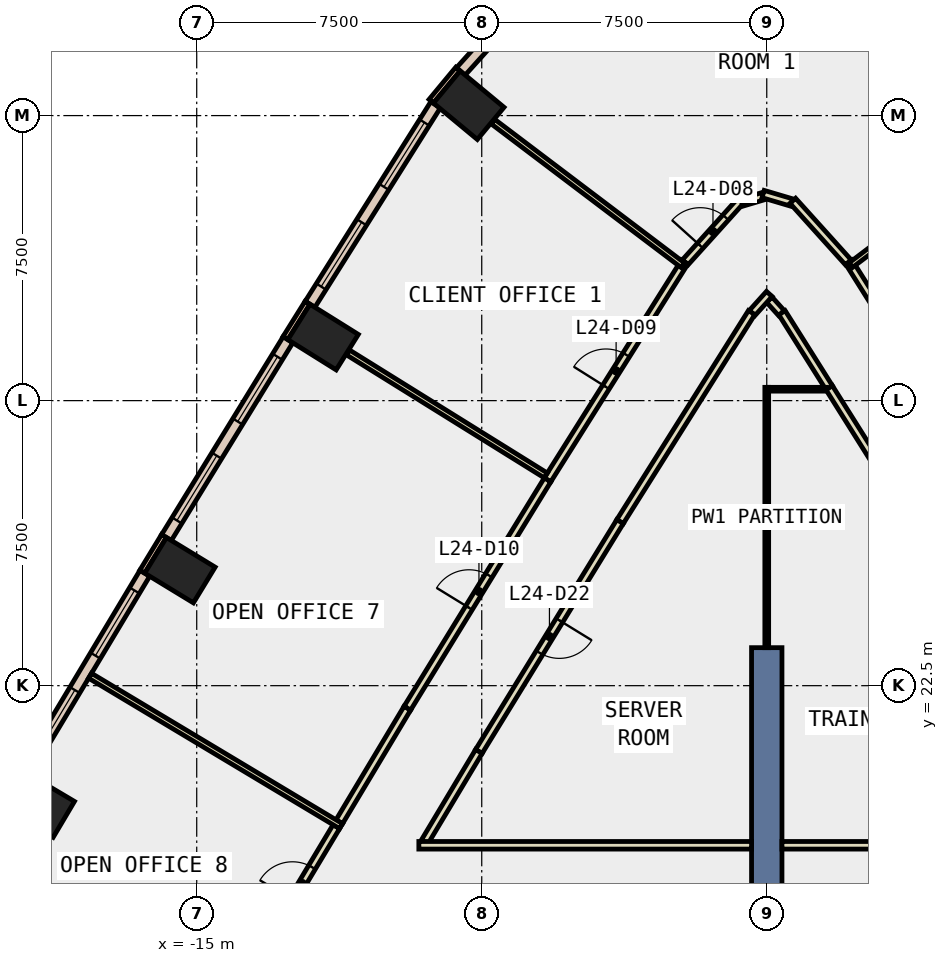
"""IFC4 building model, lengths in metres.
Left out: names, types, materials, properties, quantities, classifications, styles, units other than length and angle.
Written with IfcOpenShell. Run it as: python <this file> out.ifc"""

import sys

from ifc_helpers import new_model, si_unit, direction, frame, frame_2d, origin, origin_2d, place, context, subcontext, project, spatial, rectangle, extrude, element, fill, save


model = new_model("IFC4")
c1 = context("Model", 3, precision=1e-05, world=origin(), true_north=direction((0.0, 1.0)))
c2 = subcontext(c1, "Body", "Model", "MODEL_VIEW")
j1 = project(units=[si_unit("LENGTHUNIT", "METRE"), si_unit("PLANEANGLEUNIT", "RADIAN")], contexts=[c1])
p1 = place(None, origin())
s1 = spatial("IfcSite", under=j1, at=p1, CompositionType="ELEMENT")
p2 = place(p1, origin())
s2 = spatial("IfcBuilding", under=s1, at=p2, CompositionType="ELEMENT")
p3 = place(p2, frame((0.0, 0.0, 111.8)))
s3 = spatial("IfcBuildingStorey", under=s2, at=p3, CompositionType="ELEMENT", Elevation=111.8)
for number, where, z_axis, x_axis in (
    (1, (-7.842, 37.774, -0.4), (0.0, 0.0, 1.0), (0.638, 0.77, 0.0)),
    (2, (-11.675, 31.673, -0.4), (0.0, 0.0, 1.0), (0.53, 0.848, 0.0)),
    (3, (-15.442, 25.539, -0.4), (0.0, 0.0, 1.0), (0.52, 0.854, 0.0)),
    (4, (-19.143, 19.364, -0.4), (0.0, 0.0, 1.0), (0.51, 0.86, 0.0)),
):
    element("IfcColumn", number, at=place(p3, frame(where, z_axis=z_axis, x_axis=x_axis)), inside=s3, PredefinedType="COLUMN", context=c2, shape_type="SweptSolid", body=[
        extrude(rectangle(XDim=1.1, YDim=1.5, at=origin_2d()), origin(), (0.0, 0.0, 1.0), 4.2),
    ])
p4 = place(p3, frame((0.0, 14.5, -0.4), z_axis=(0.0, 0.0, 1.0), x_axis=(0.0, 1.0, 0.0)))
e5 = element("IfcWall", 5, at=p4, inside=s3, PredefinedType="SHEAR", context=c2, shape_type="SweptSolid", body=[
    extrude(rectangle(XDim=9.0, YDim=0.8, at=frame_2d((4.5, 0.0))), origin(), (0.0, 0.0, 1.0), 4.2),
])
p5 = place(p3, frame((-8.126, 38.724, 0.0), z_axis=(0.0, 0.0, 1.0), x_axis=(-0.638435351024, -0.769675452748, 0.0)))
e6 = element("IfcWall", 6, at=p5, inside=s3, PredefinedType="STANDARD", context=c2, shape_type="SweptSolid", body=[
    extrude(rectangle(XDim=1.099, YDim=0.15, at=frame_2d((0.55, 0.0))), origin(), (0.0, 0.0, 1.0), 3.8),
])
p6 = place(p3, frame((-12.083, 32.577, 0.0), z_axis=(0.0, 0.0, 1.0), x_axis=(-0.52997899071, -0.848010771987, 0.0)))
e7 = element("IfcWall", 7, at=p6, inside=s3, PredefinedType="STANDARD", context=c2, shape_type="SweptSolid", body=[
    extrude(rectangle(XDim=1.1, YDim=0.15, at=frame_2d((0.55, 0.0))), origin(), (0.0, 0.0, 1.0), 3.8),
])
p7 = place(p3, frame((-15.861, 26.438, 0.0), z_axis=(0.0, 0.0, 1.0), x_axis=(-0.519869515594, -0.854245682901, 0.0)))
e8 = element("IfcWall", 8, at=p7, inside=s3, PredefinedType="STANDARD", context=c2, shape_type="SweptSolid", body=[
    extrude(rectangle(XDim=1.1, YDim=0.15, at=frame_2d((0.55, 0.0))), origin(), (0.0, 0.0, 1.0), 3.8),
])
p8 = place(p3, frame((-5.445, 41.552, 0.0), z_axis=(0.0, 0.0, 1.0), x_axis=(-0.66966434159, -0.742663900834, 0.0)))
e9 = element("IfcWall", 9, at=p8, inside=s3, PredefinedType="STANDARD", context=c2, shape_type="SweptSolid", body=[
    extrude(rectangle(XDim=3.893, YDim=0.3, at=frame_2d((1.946, 0.0))), origin(), (0.0, 0.0, 1.0), 3.8),
])
p9 = place(p8, frame((1.246, 0.0, 0.9)))
e10 = element("IfcOpeningElement", 10, at=p9, cuts=e9, PredefinedType="OPENING", context=c2, shape_type="SweptSolid", body=[
    extrude(rectangle(XDim=1.4, YDim=2.6, at=frame_2d((0.7, 1.3))), frame((0.0, 0.16, 0.0), z_axis=(0.0, -1.0, 0.0), x_axis=(1.0, 0.0, 0.0)), (0.0, 0.0, 1.0), 0.32),
])
p10 = place(p3, frame((-8.714, 37.784, 0.0), z_axis=(0.0, 0.0, 1.0), x_axis=(-0.532699467907, -0.846304482377, 0.0)))
e11 = element("IfcWall", 11, at=p10, inside=s3, PredefinedType="STANDARD", context=c2, shape_type="SweptSolid", body=[
    extrude(rectangle(XDim=6.202, YDim=0.3, at=frame_2d((3.101, 0.0))), origin(), (0.0, 0.0, 1.0), 3.8),
])
p11 = place(p10, frame((0.551, 0.0, 0.9)))
e12 = element("IfcOpeningElement", 12, at=p11, cuts=e11, PredefinedType="OPENING", context=c2, shape_type="SweptSolid", body=[
    extrude(rectangle(XDim=2.0, YDim=2.6, at=frame_2d((1.0, 1.3))), frame((0.0, 0.16, 0.0), z_axis=(0.0, -1.0, 0.0), x_axis=(1.0, 0.0, 0.0)), (0.0, 0.0, 1.0), 0.32),
])
p12 = place(p10, frame((3.652, 0.0, 0.9)))
e13 = element("IfcOpeningElement", 13, at=p12, cuts=e11, PredefinedType="OPENING", context=c2, shape_type="SweptSolid", body=[
    extrude(rectangle(XDim=2.0, YDim=2.6, at=frame_2d((1.0, 1.3))), frame((0.0, 0.16, 0.0), z_axis=(0.0, -1.0, 0.0), x_axis=(1.0, 0.0, 0.0)), (0.0, 0.0, 1.0), 0.32),
])
p13 = place(p3, frame((-12.598, 31.603, 0.0), z_axis=(0.0, 0.0, 1.0), x_axis=(-0.523417276981, -0.852076495485, 0.0)))
e14 = element("IfcWall", 14, at=p13, inside=s3, PredefinedType="STANDARD", context=c2, shape_type="SweptSolid", body=[
    extrude(rectangle(XDim=6.11, YDim=0.3, at=frame_2d((3.055, 0.0))), origin(), (0.0, 0.0, 1.0), 3.8),
])
p14 = place(p13, frame((0.527, 0.0, 0.9)))
e15 = element("IfcOpeningElement", 15, at=p14, cuts=e14, PredefinedType="OPENING", context=c2, shape_type="SweptSolid", body=[
    extrude(rectangle(XDim=2.0, YDim=2.6, at=frame_2d((1.0, 1.3))), frame((0.0, 0.16, 0.0), z_axis=(0.0, -1.0, 0.0), x_axis=(1.0, 0.0, 0.0)), (0.0, 0.0, 1.0), 0.32),
])
p15 = place(p13, frame((3.582, 0.0, 0.9)))
e16 = element("IfcOpeningElement", 16, at=p15, cuts=e14, PredefinedType="OPENING", context=c2, shape_type="SweptSolid", body=[
    extrude(rectangle(XDim=2.0, YDim=2.6, at=frame_2d((1.0, 1.3))), frame((0.0, 0.16, 0.0), z_axis=(0.0, -1.0, 0.0), x_axis=(1.0, 0.0, 0.0)), (0.0, 0.0, 1.0), 0.32),
])
p16 = place(p3, frame((-16.365, 25.458, 0.0), z_axis=(0.0, 0.0, 1.0), x_axis=(-0.514078503149, -0.857743139057, 0.0)))
e17 = element("IfcWall", 17, at=p16, inside=s3, PredefinedType="STANDARD", context=c2, shape_type="SweptSolid", body=[
    extrude(rectangle(XDim=6.11, YDim=0.3, at=frame_2d((3.055, 0.0))), origin(), (0.0, 0.0, 1.0), 3.8),
])
p17 = place(p16, frame((0.528, 0.0, 0.9)))
e18 = element("IfcOpeningElement", 18, at=p17, cuts=e17, PredefinedType="OPENING", context=c2, shape_type="SweptSolid", body=[
    extrude(rectangle(XDim=2.0, YDim=2.6, at=frame_2d((1.0, 1.3))), frame((0.0, 0.16, 0.0), z_axis=(0.0, -1.0, 0.0), x_axis=(1.0, 0.0, 0.0)), (0.0, 0.0, 1.0), 0.32),
])
p18 = place(p16, frame((3.583, 0.0, 0.9)))
e19 = element("IfcOpeningElement", 19, at=p18, cuts=e17, PredefinedType="OPENING", context=c2, shape_type="SweptSolid", body=[
    extrude(rectangle(XDim=2.0, YDim=2.6, at=frame_2d((1.0, 1.3))), frame((0.0, 0.16, 0.0), z_axis=(0.0, -1.0, 0.0), x_axis=(1.0, 0.0, 0.0)), (0.0, 0.0, 1.0), 0.32),
])
p19 = place(p3, frame((3.861, 26.816, 0.0), z_axis=(0.0, 0.0, 1.0), x_axis=(-0.532782188792, 0.846252408745, 0.0)))
e20 = element("IfcWall", 20, at=p19, inside=s3, PredefinedType="PARTITIONING", context=c2, shape_type="SweptSolid", body=[
    extrude(rectangle(XDim=4.167, YDim=0.2, at=frame_2d((2.083, 0.0))), origin(), (0.0, 0.0, 1.0), 3.8),
])
p20 = place(p3, frame((1.641, 30.342, 0.0), z_axis=(0.0, 0.0, 1.0), x_axis=(-0.532732797088, 0.846283502679, 0.0)))
e21 = element("IfcWall", 21, at=p20, inside=s3, PredefinedType="PARTITIONING", context=c2, shape_type="SweptSolid", body=[
    extrude(rectangle(XDim=2.333, YDim=0.2, at=frame_2d((1.167, 0.0))), origin(), (0.0, 0.0, 1.0), 3.8),
])
p21 = place(p3, frame((0.384, 32.306, 0.0), z_axis=(0.0, 0.0, 1.0), x_axis=(-0.669306261406, 0.742986627365, 0.0)))
e22 = element("IfcWall", 22, at=p21, inside=s3, PredefinedType="PARTITIONING", context=c2, shape_type="SweptSolid", body=[
    extrude(rectangle(XDim=0.474, YDim=0.2, at=frame_2d((0.237, 0.0))), origin(), (0.0, 0.0, 1.0), 3.8),
])
p22 = place(p3, frame((0.067, 32.807, 0.0), z_axis=(0.0, 0.0, 1.0), x_axis=(-0.66900475403, -0.74325812413, 0.0)))
e23 = element("IfcWall", 23, at=p22, inside=s3, PredefinedType="PARTITIONING", context=c2, shape_type="SweptSolid", body=[
    extrude(rectangle(XDim=0.674, YDim=0.2, at=frame_2d((0.337, 0.0))), origin(), (0.0, 0.0, 1.0), 3.8),
])
p23 = place(p3, frame((-0.398, 32.317, 0.0), z_axis=(0.0, 0.0, 1.0), x_axis=(-0.53276445777, -0.846263571553, 0.0)))
e24 = element("IfcWall", 24, at=p23, inside=s3, PredefinedType="PARTITIONING", context=c2, shape_type="SweptSolid", body=[
    extrude(rectangle(XDim=6.5, YDim=0.2, at=frame_2d((3.25, 0.0))), origin(), (0.0, 0.0, 1.0), 3.8),
])
p24 = place(p3, frame((-3.861, 26.816, 0.0), z_axis=(0.0, 0.0, 1.0), x_axis=(-0.523390991338, -0.852092641786, 0.0)))
e25 = element("IfcWall", 25, at=p24, inside=s3, PredefinedType="PARTITIONING", context=c2, shape_type="SweptSolid", body=[
    extrude(rectangle(XDim=7.098, YDim=0.2, at=frame_2d((3.549, 0.0))), origin(), (0.0, 0.0, 1.0), 3.8),
])
p25 = place(p24, frame((3.049, 0.0, 0.0)))
e26 = element("IfcOpeningElement", 26, at=p25, cuts=e25, PredefinedType="OPENING", context=c2, shape_type="SweptSolid", body=[
    extrude(rectangle(XDim=1.0, YDim=2.1, at=frame_2d((0.5, 1.05))), frame((0.0, 0.11, 0.0), z_axis=(0.0, -1.0, 0.0), x_axis=(1.0, 0.0, 0.0)), (0.0, 0.0, 1.0), 0.22),
])
p26 = place(p3, frame((-7.576, 20.768, 0.0), z_axis=(0.0, 0.0, 1.0), x_axis=(-0.513900868925, -0.857849577092, 0.0)))
e27 = element("IfcWall", 27, at=p26, inside=s3, PredefinedType="PARTITIONING", context=c2, shape_type="SweptSolid", body=[
    extrude(rectangle(XDim=2.777, YDim=0.2, at=frame_2d((1.388, 0.0))), origin(), (0.0, 0.0, 1.0), 3.8),
])
p27 = place(p3, frame((2.159, 33.649, 0.0), z_axis=(0.0, 0.0, 1.0), x_axis=(0.532784927572, -0.846250684462, 0.0)))
e28 = element("IfcWall", 28, at=p27, inside=s3, PredefinedType="PARTITIONING", context=c2, shape_type="SweptSolid", body=[
    extrude(rectangle(XDim=6.626, YDim=0.2, at=frame_2d((3.313, 0.0))), origin(), (0.0, 0.0, 1.0), 3.8),
])
p28 = place(p27, frame((2.888, 0.0, 0.0)))
e29 = element("IfcOpeningElement", 29, at=p28, cuts=e28, PredefinedType="OPENING", context=c2, shape_type="SweptSolid", body=[
    extrude(rectangle(XDim=1.0, YDim=2.1, at=frame_2d((0.5, 1.05))), frame((0.0, 0.11, 0.0), z_axis=(0.0, -1.0, 0.0), x_axis=(1.0, 0.0, 0.0)), (0.0, 0.0, 1.0), 0.22),
])
p29 = place(p3, frame((-2.145, 33.639, 0.0), z_axis=(0.0, 0.0, 1.0), x_axis=(0.66965737341, 0.742670184023, 0.0)))
e30 = element("IfcWall", 30, at=p29, inside=s3, PredefinedType="PARTITIONING", context=c2, shape_type="SweptSolid", body=[
    extrude(rectangle(XDim=2.18, YDim=0.2, at=frame_2d((1.09, 0.0))), origin(), (0.0, 0.0, 1.0), 3.8),
])
p30 = place(p29, frame((0.59, 0.0, 0.0)))
e31 = element("IfcOpeningElement", 31, at=p30, cuts=e30, PredefinedType="OPENING", context=c2, shape_type="SweptSolid", body=[
    extrude(rectangle(XDim=1.0, YDim=2.1, at=frame_2d((0.5, 1.05))), frame((0.0, 0.11, 0.0), z_axis=(0.0, -1.0, 0.0), x_axis=(1.0, 0.0, 0.0)), (0.0, 0.0, 1.0), 0.22),
])
p31 = place(p3, frame((-0.656, 35.213, 0.0), z_axis=(0.0, 0.0, 1.0), x_axis=(0.958764375257, 0.284202168777, 0.0)))
e32 = element("IfcWall", 32, at=p31, inside=s3, PredefinedType="PARTITIONING", context=c2, shape_type="SweptSolid", body=[
    extrude(rectangle(XDim=0.584, YDim=0.2, at=frame_2d((0.292, 0.0))), origin(), (0.0, 0.0, 1.0), 3.8),
])
p32 = place(p3, frame((-0.096, 35.436, 0.0), z_axis=(0.0, 0.0, 1.0), x_axis=(0.95867870552, -0.284491018456, 0.0)))
e33 = element("IfcWall", 33, at=p32, inside=s3, PredefinedType="PARTITIONING", context=c2, shape_type="SweptSolid", body=[
    extrude(rectangle(XDim=0.784, YDim=0.2, at=frame_2d((0.392, 0.0))), origin(), (0.0, 0.0, 1.0), 3.8),
])
p33 = place(p3, frame((0.685, 35.258, 0.0), z_axis=(0.0, 0.0, 1.0), x_axis=(0.66965737341, -0.742670184023, 0.0)))
e34 = element("IfcWall", 34, at=p33, inside=s3, PredefinedType="PARTITIONING", context=c2, shape_type="SweptSolid", body=[
    extrude(rectangle(XDim=2.18, YDim=0.2, at=frame_2d((1.09, 0.0))), origin(), (0.0, 0.0, 1.0), 3.8),
])
p34 = place(p3, frame((-5.769, 27.915, 0.0), z_axis=(0.0, 0.0, 1.0), x_axis=(0.532800846123, 0.846240662206, 0.0)))
e35 = element("IfcWall", 35, at=p34, inside=s3, PredefinedType="PARTITIONING", context=c2, shape_type="SweptSolid", body=[
    extrude(rectangle(XDim=6.776, YDim=0.2, at=frame_2d((3.388, 0.0))), origin(), (0.0, 0.0, 1.0), 3.8),
])
p35 = place(p34, frame((2.888, 0.0, 0.0)))
e36 = element("IfcOpeningElement", 36, at=p35, cuts=e35, PredefinedType="OPENING", context=c2, shape_type="SweptSolid", body=[
    extrude(rectangle(XDim=1.0, YDim=2.1, at=frame_2d((0.5, 1.05))), frame((0.0, 0.11, 0.0), z_axis=(0.0, -1.0, 0.0), x_axis=(1.0, 0.0, 0.0)), (0.0, 0.0, 1.0), 0.22),
])
p36 = place(p3, frame((-11.249, 18.918, 0.0), z_axis=(0.0, 0.0, 1.0), x_axis=(0.513949903813, 0.857820200491, 0.0)))
e37 = element("IfcWall", 37, at=p36, inside=s3, PredefinedType="PARTITIONING", context=c2, shape_type="SweptSolid", body=[
    extrude(rectangle(XDim=3.487, YDim=0.2, at=frame_2d((1.743, 0.0))), origin(), (0.0, 0.0, 1.0), 3.8),
])
p37 = place(p3, frame((-9.457, 21.909, 0.0), z_axis=(0.0, 0.0, 1.0), x_axis=(0.523366731761, 0.852107542559, 0.0)))
e38 = element("IfcWall", 38, at=p37, inside=s3, PredefinedType="PARTITIONING", context=c2, shape_type="SweptSolid", body=[
    extrude(rectangle(XDim=7.049, YDim=0.2, at=frame_2d((3.524, 0.0))), origin(), (0.0, 0.0, 1.0), 3.8),
])
p38 = place(p37, frame((3.099, 0.0, 0.0)))
e39 = element("IfcOpeningElement", 39, at=p38, cuts=e38, PredefinedType="OPENING", context=c2, shape_type="SweptSolid", body=[
    extrude(rectangle(XDim=1.0, YDim=2.1, at=frame_2d((0.5, 1.05))), frame((0.0, 0.11, 0.0), z_axis=(0.0, -1.0, 0.0), x_axis=(1.0, 0.0, 0.0)), (0.0, 0.0, 1.0), 0.22),
])
p39 = place(p3, frame((-13.119, 15.799, 0.0), z_axis=(0.0, 0.0, 1.0), x_axis=(0.514155958966, 0.857696712049, 0.0)))
e40 = element("IfcWall", 40, at=p39, inside=s3, PredefinedType="PARTITIONING", context=c2, shape_type="SweptSolid", body=[
    extrude(rectangle(XDim=3.487, YDim=0.2, at=frame_2d((1.744, 0.0))), origin(), (0.0, 0.0, 1.0), 3.8),
])
p40 = place(p39, frame((1.244, 0.0, 0.0)))
e41 = element("IfcOpeningElement", 41, at=p40, cuts=e40, PredefinedType="OPENING", context=c2, shape_type="SweptSolid", body=[
    extrude(rectangle(XDim=1.0, YDim=2.1, at=frame_2d((0.5, 1.05))), frame((0.0, 0.11, 0.0), z_axis=(0.0, -1.0, 0.0), x_axis=(1.0, 0.0, 0.0)), (0.0, 0.0, 1.0), 0.22),
])
for number, where, z_axis, x_axis in (
    (42, (0.4, 18.3, 0.0), (0.0, 0.0, 1.0), (1.0, 0.0, 0.0)),
    (43, (-9.155, 18.3, 0.0), (0.0, 0.0, 1.0), (1.0, 0.0, 0.0)),
):
    element("IfcWall", number, at=place(p3, frame(where, z_axis=z_axis, x_axis=x_axis)), inside=s3, PredefinedType="PARTITIONING", context=c2, shape_type="SweptSolid", body=[
        extrude(rectangle(XDim=8.755, YDim=0.2, at=frame_2d((4.377, 0.0))), origin(), (0.0, 0.0, 1.0), 3.8),
    ])
p41 = place(p3, frame((0.0, 23.5, 0.0), z_axis=(0.0, 0.0, 1.0), x_axis=(0.0, 1.0, 0.0)))
e44 = element("IfcWall", 44, at=p41, inside=s3, PredefinedType="PARTITIONING", context=c2, shape_type="SweptSolid", body=[
    extrude(rectangle(XDim=6.85, YDim=0.1, at=frame_2d((3.425, 0.0))), origin(), (0.0, 0.0, 1.0), 3.8),
])
p42 = place(p3, frame((0.05, 30.3, 0.0), z_axis=(0.0, 0.0, 1.0), x_axis=(1.0, 0.0, 0.0)))
e45 = element("IfcWall", 45, at=p42, inside=s3, PredefinedType="PARTITIONING", context=c2, shape_type="SweptSolid", body=[
    extrude(rectangle(XDim=1.518, YDim=0.1, at=frame_2d((0.759, 0.0))), origin(), (0.0, 0.0, 1.0), 3.8),
])
for number, where, z_axis, x_axis in (
    (46, (2.212, 33.565, 0.0), (0.0, 0.0, 1.0), (0.797, 0.603, 0.0)),
    (47, (-2.212, 33.565, 0.0), (0.0, 0.0, 1.0), (-0.797, 0.603, 0.0)),
):
    element("IfcWall", number, at=place(p3, frame(where, z_axis=z_axis, x_axis=x_axis)), inside=s3, PredefinedType="PARTITIONING", context=c2, shape_type="SweptSolid", body=[
        extrude(rectangle(XDim=6.257, YDim=0.15, at=frame_2d((3.128, 0.0))), origin(), (0.0, 0.0, 1.0), 3.8),
    ])
p43 = place(p3, frame((-5.814, 28.031, 0.0), z_axis=(0.0, 0.0, 1.0), x_axis=(-0.849222099047, 0.528035819324, 0.0)))
e48 = element("IfcWall", 48, at=p43, inside=s3, PredefinedType="PARTITIONING", context=c2, shape_type="SweptSolid", body=[
    extrude(rectangle(XDim=6.13, YDim=0.15, at=frame_2d((3.065, 0.0))), origin(), (0.0, 0.0, 1.0), 3.8),
])
p44 = place(p3, frame((-11.202, 18.803, 0.0), z_axis=(0.0, 0.0, 1.0), x_axis=(-0.857778149162, 0.514020084062, 0.0)))
e49 = element("IfcWall", 49, at=p44, inside=s3, PredefinedType="PARTITIONING", context=c2, shape_type="SweptSolid", body=[
    extrude(rectangle(XDim=7.7, YDim=0.15, at=frame_2d((3.85, 0.0))), origin(), (0.0, 0.0, 1.0), 3.8),
])
p45 = place(p11, origin())
e50 = element("IfcWindow", 50, at=p45, inside=s3, PartitioningType="SINGLE_PANEL", PredefinedType="WINDOW", context=c2, shape_type="SweptSolid", body=[
    extrude(rectangle(XDim=2.0, YDim=2.6, at=frame_2d((1.0, 1.3))), frame((0.0, 0.03, 0.0), z_axis=(0.0, -1.0, 0.0), x_axis=(1.0, 0.0, 0.0)), (0.0, 0.0, 1.0), 0.06),
])
fill(e12, e50)
p46 = place(p12, origin())
e51 = element("IfcWindow", 51, at=p46, inside=s3, PartitioningType="SINGLE_PANEL", PredefinedType="WINDOW", context=c2, shape_type="SweptSolid", body=[
    extrude(rectangle(XDim=2.0, YDim=2.6, at=frame_2d((1.0, 1.3))), frame((0.0, 0.03, 0.0), z_axis=(0.0, -1.0, 0.0), x_axis=(1.0, 0.0, 0.0)), (0.0, 0.0, 1.0), 0.06),
])
fill(e13, e51)
p47 = place(p14, origin())
e52 = element("IfcWindow", 52, at=p47, inside=s3, PartitioningType="SINGLE_PANEL", PredefinedType="WINDOW", context=c2, shape_type="SweptSolid", body=[
    extrude(rectangle(XDim=2.0, YDim=2.6, at=frame_2d((1.0, 1.3))), frame((0.0, 0.03, 0.0), z_axis=(0.0, -1.0, 0.0), x_axis=(1.0, 0.0, 0.0)), (0.0, 0.0, 1.0), 0.06),
])
fill(e15, e52)
p48 = place(p15, origin())
e53 = element("IfcWindow", 53, at=p48, inside=s3, PartitioningType="SINGLE_PANEL", PredefinedType="WINDOW", context=c2, shape_type="SweptSolid", body=[
    extrude(rectangle(XDim=2.0, YDim=2.6, at=frame_2d((1.0, 1.3))), frame((0.0, 0.03, 0.0), z_axis=(0.0, -1.0, 0.0), x_axis=(1.0, 0.0, 0.0)), (0.0, 0.0, 1.0), 0.06),
])
fill(e16, e53)
p49 = place(p17, origin())
e54 = element("IfcWindow", 54, at=p49, inside=s3, PartitioningType="SINGLE_PANEL", PredefinedType="WINDOW", context=c2, shape_type="SweptSolid", body=[
    extrude(rectangle(XDim=2.0, YDim=2.6, at=frame_2d((1.0, 1.3))), frame((0.0, 0.03, 0.0), z_axis=(0.0, -1.0, 0.0), x_axis=(1.0, 0.0, 0.0)), (0.0, 0.0, 1.0), 0.06),
])
fill(e18, e54)
p50 = place(p18, origin())
e55 = element("IfcWindow", 55, at=p50, inside=s3, PartitioningType="SINGLE_PANEL", PredefinedType="WINDOW", context=c2, shape_type="SweptSolid", body=[
    extrude(rectangle(XDim=2.0, YDim=2.6, at=frame_2d((1.0, 1.3))), frame((0.0, 0.03, 0.0), z_axis=(0.0, -1.0, 0.0), x_axis=(1.0, 0.0, 0.0)), (0.0, 0.0, 1.0), 0.06),
])
fill(e19, e55)
p51 = place(p30, origin())
e56 = element("IfcDoor", 56, at=p51, inside=s3, OperationType="SINGLE_SWING_LEFT", PredefinedType="DOOR", context=c2, shape_type="SweptSolid", body=[
    extrude(rectangle(XDim=1.0, YDim=2.1, at=frame_2d((0.5, 1.05))), frame((0.0, 0.025, 0.0), z_axis=(0.0, -1.0, 0.0), x_axis=(1.0, 0.0, 0.0)), (0.0, 0.0, 1.0), 0.05),
])
fill(e31, e56)
p52 = place(p35, origin())
e57 = element("IfcDoor", 57, at=p52, inside=s3, OperationType="SINGLE_SWING_LEFT", PredefinedType="DOOR", context=c2, shape_type="SweptSolid", body=[
    extrude(rectangle(XDim=1.0, YDim=2.1, at=frame_2d((0.5, 1.05))), frame((0.0, 0.025, 0.0), z_axis=(0.0, -1.0, 0.0), x_axis=(1.0, 0.0, 0.0)), (0.0, 0.0, 1.0), 0.05),
])
fill(e36, e57)
p53 = place(p38, origin())
e58 = element("IfcDoor", 58, at=p53, inside=s3, OperationType="SINGLE_SWING_LEFT", PredefinedType="DOOR", context=c2, shape_type="SweptSolid", body=[
    extrude(rectangle(XDim=1.0, YDim=2.1, at=frame_2d((0.5, 1.05))), frame((0.0, 0.025, 0.0), z_axis=(0.0, -1.0, 0.0), x_axis=(1.0, 0.0, 0.0)), (0.0, 0.0, 1.0), 0.05),
])
fill(e39, e58)
p54 = place(p40, origin())
e59 = element("IfcDoor", 59, at=p54, inside=s3, OperationType="SINGLE_SWING_LEFT", PredefinedType="DOOR", context=c2, shape_type="SweptSolid", body=[
    extrude(rectangle(XDim=1.0, YDim=2.1, at=frame_2d((0.5, 1.05))), frame((0.0, 0.025, 0.0), z_axis=(0.0, -1.0, 0.0), x_axis=(1.0, 0.0, 0.0)), (0.0, 0.0, 1.0), 0.05),
])
fill(e41, e59)
p55 = place(p25, origin())
e60 = element("IfcDoor", 60, at=p55, inside=s3, OperationType="SINGLE_SWING_LEFT", PredefinedType="DOOR", context=c2, shape_type="SweptSolid", body=[
    extrude(rectangle(XDim=1.0, YDim=2.1, at=frame_2d((0.5, 1.05))), frame((0.0, 0.025, 0.0), z_axis=(0.0, -1.0, 0.0), x_axis=(1.0, 0.0, 0.0)), (0.0, 0.0, 1.0), 0.05),
])
fill(e26, e60)
save(model, sys.argv[1])
